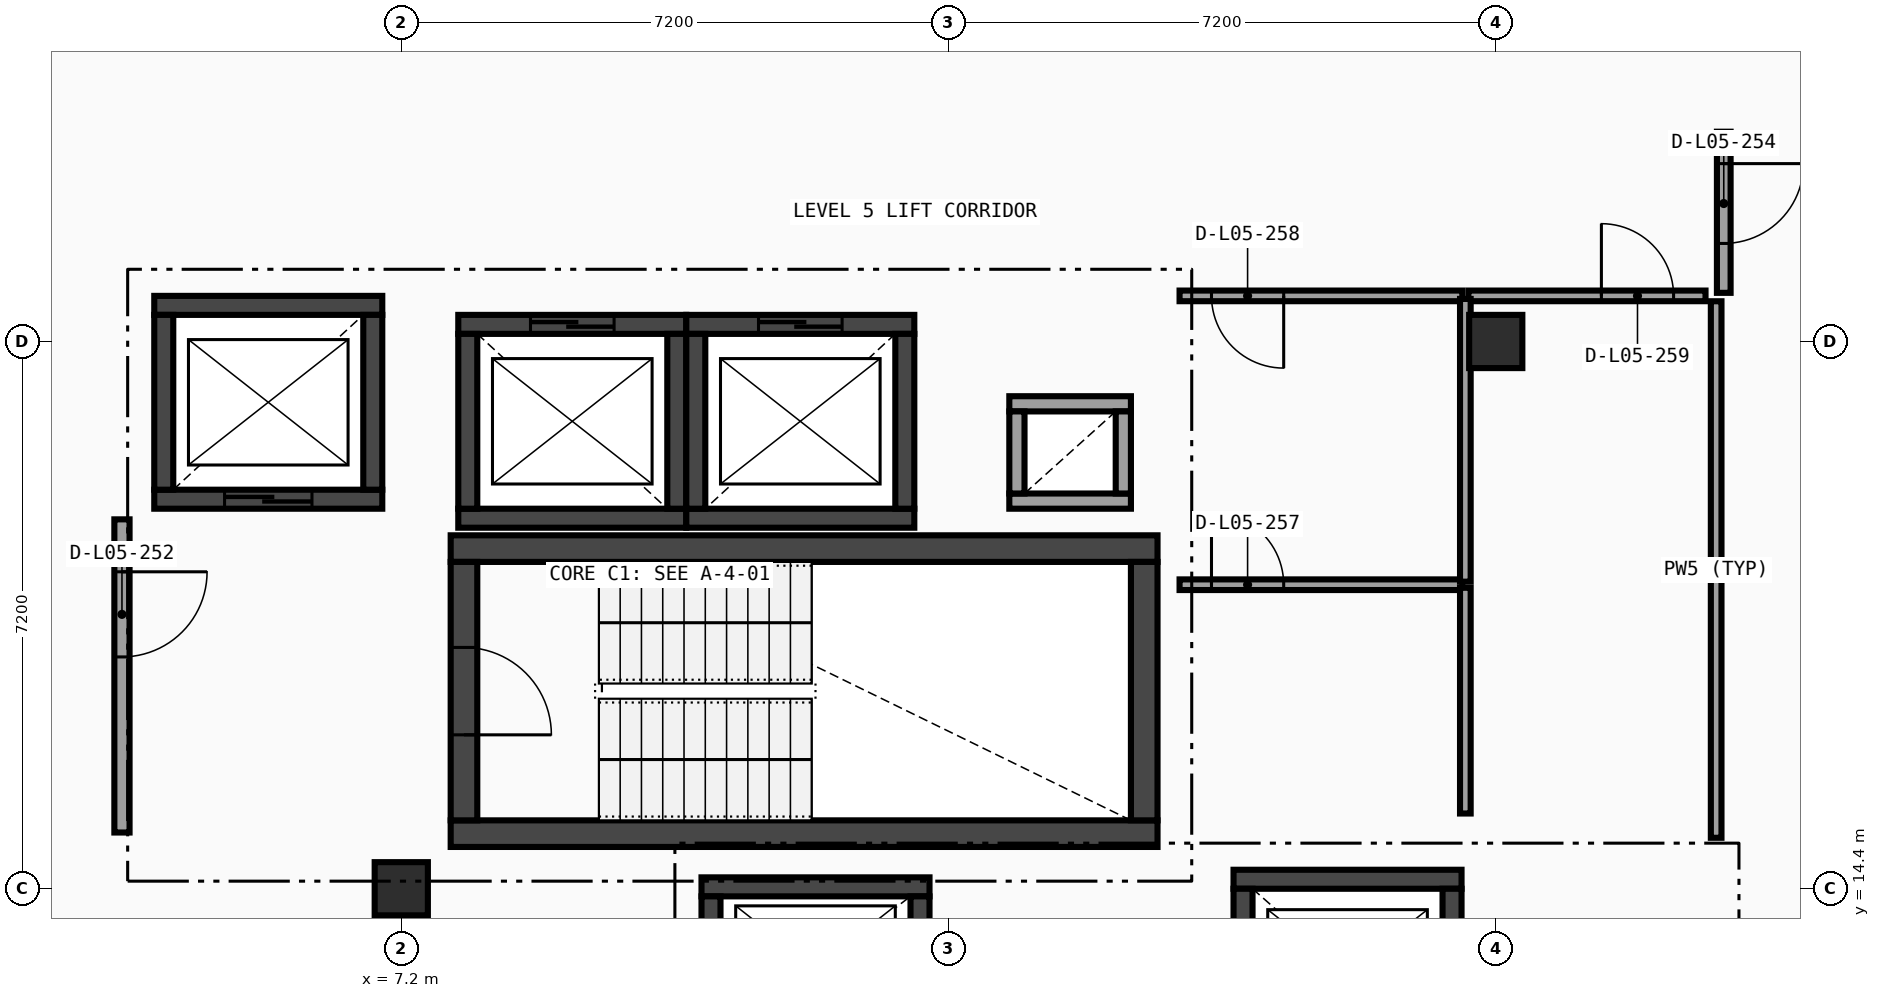
"""IFC4 building model, lengths in metres.
Left out: names, types, materials, properties, quantities, classifications, styles, units other than length and angle.
Written with IfcOpenShell. Run it as: python <this file> out.ifc"""

import sys

from ifc_helpers import new_model, si_unit, direction, frame, frame_2d, origin, origin_2d, place, context, subcontext, project, spatial, rectangle, extrude, element, fill, save


model = new_model("IFC4")
c1 = context("Model", 3, precision=1e-05, world=origin(), true_north=direction((0.0, 1.0)))
c2 = subcontext(c1, "Body", "Model", "MODEL_VIEW")
j1 = project(units=[si_unit("LENGTHUNIT", "METRE"), si_unit("PLANEANGLEUNIT", "RADIAN")], contexts=[c1])
p1 = place(None, origin())
s1 = spatial("IfcSite", under=j1, at=p1, CompositionType="ELEMENT")
p2 = place(p1, origin())
s2 = spatial("IfcBuilding", under=s1, at=p2, CompositionType="ELEMENT")
p3 = place(p2, frame((0.0, 0.0, 22.95)))
s3 = spatial("IfcBuildingStorey", under=s2, at=p3, CompositionType="ELEMENT", Elevation=22.95)
for number, where, z_axis, x_axis in (
    (1, (7.2, 14.4, 0.0), (0.0, 0.0, 1.0), (1.0, 0.0, 0.0)),
    (2, (21.6, 21.6, 0.0), (0.0, 0.0, 1.0), (1.0, 0.0, 0.0)),
):
    element("IfcColumn", number, at=place(p3, frame(where, z_axis=z_axis, x_axis=x_axis)), inside=s3, PredefinedType="COLUMN", context=c2, shape_type="SweptSolid", body=[
        extrude(rectangle(XDim=0.7, YDim=0.7, at=origin_2d()), origin(), (0.0, 0.0, 1.0), 4.05),
    ])
for number, where, z_axis, x_axis in (
    (3, (7.85, 15.125, 0.0), (0.0, 0.0, 1.0), (1.0, 0.0, 0.0)),
    (4, (17.15, 18.875, 0.0), (0.0, 0.0, 1.0), (-1.0, 0.0, 0.0)),
):
    element("IfcWall", number, at=place(p3, frame(where, z_axis=z_axis, x_axis=x_axis)), inside=s3, PredefinedType="SHEAR", context=c2, shape_type="SweptSolid", body=[
        extrude(rectangle(XDim=9.3, YDim=0.35, at=frame_2d((4.65, 0.0))), origin(), (0.0, 0.0, 1.0), 3.8),
    ])
p4 = place(p3, frame((8.025, 18.7, 0.0), z_axis=(0.0, 0.0, 1.0), x_axis=(0.0, -1.0, 0.0)))
e5 = element("IfcWall", 5, at=p4, inside=s3, PredefinedType="SHEAR", context=c2, shape_type="SweptSolid", body=[
    extrude(rectangle(XDim=3.4, YDim=0.35, at=frame_2d((1.7, 0.0))), origin(), (0.0, 0.0, 1.0), 3.8),
])
p5 = place(p4, frame((1.125, 0.0, 0.0)))
e6 = element("IfcOpeningElement", 6, at=p5, cuts=e5, PredefinedType="OPENING", context=c2, shape_type="SweptSolid", body=[
    extrude(rectangle(XDim=1.15, YDim=2.1, at=frame_2d((0.575, 1.05))), frame((0.0, 0.185, 0.0), z_axis=(0.0, -1.0, 0.0), x_axis=(1.0, 0.0, 0.0)), (0.0, 0.0, 1.0), 0.37),
])
p6 = place(p3, frame((16.975, 15.3, 0.0), z_axis=(0.0, 0.0, 1.0), x_axis=(0.0, 1.0, 0.0)))
e7 = element("IfcWall", 7, at=p6, inside=s3, PredefinedType="SHEAR", context=c2, shape_type="SweptSolid", body=[
    extrude(rectangle(XDim=3.4, YDim=0.35, at=frame_2d((1.7, 0.0))), origin(), (0.0, 0.0, 1.0), 3.8),
])
p7 = place(p3, frame((3.95, 19.525, 0.0), z_axis=(0.0, 0.0, 1.0), x_axis=(1.0, 0.0, 0.0)))
e8 = element("IfcWall", 8, at=p7, inside=s3, PredefinedType="SHEAR", context=c2, shape_type="SweptSolid", body=[
    extrude(rectangle(XDim=3.0, YDim=0.25, at=frame_2d((1.5, 0.0))), origin(), (0.0, 0.0, 1.0), 3.8),
])
p8 = place(p7, frame((0.925, 0.0, 0.0)))
e9 = element("IfcOpeningElement", 9, at=p8, cuts=e8, PredefinedType="OPENING", context=c2, shape_type="SweptSolid", body=[
    extrude(rectangle(XDim=1.15, YDim=2.1, at=frame_2d((0.575, 1.05))), frame((0.0, 0.135, 0.0), z_axis=(0.0, -1.0, 0.0), x_axis=(1.0, 0.0, 0.0)), (0.0, 0.0, 1.0), 0.27),
])
p9 = place(p3, frame((6.95, 22.075, 0.0), z_axis=(0.0, 0.0, 1.0), x_axis=(-1.0, 0.0, 0.0)))
e10 = element("IfcWall", 10, at=p9, inside=s3, PredefinedType="SHEAR", context=c2, shape_type="SweptSolid", body=[
    extrude(rectangle(XDim=3.0, YDim=0.25, at=frame_2d((1.5, 0.0))), origin(), (0.0, 0.0, 1.0), 3.8),
])
for number, where, z_axis, x_axis in (
    (11, (4.075, 21.95, 0.0), (0.0, 0.0, 1.0), (0.0, -1.0, 0.0)),
    (12, (6.825, 19.65, 0.0), (0.0, 0.0, 1.0), (0.0, 1.0, 0.0)),
):
    element("IfcWall", number, at=place(p3, frame(where, z_axis=z_axis, x_axis=x_axis)), inside=s3, PredefinedType="SHEAR", context=c2, shape_type="SweptSolid", body=[
        extrude(rectangle(XDim=2.3, YDim=0.25, at=frame_2d((1.15, 0.0))), origin(), (0.0, 0.0, 1.0), 3.8),
    ])
p10 = place(p3, frame((7.95, 19.275, 0.0), z_axis=(0.0, 0.0, 1.0), x_axis=(1.0, 0.0, 0.0)))
e13 = element("IfcWall", 13, at=p10, inside=s3, PredefinedType="SHEAR", context=c2, shape_type="SweptSolid", body=[
    extrude(rectangle(XDim=3.0, YDim=0.25, at=frame_2d((1.5, 0.0))), origin(), (0.0, 0.0, 1.0), 3.8),
])
p11 = place(p3, frame((10.95, 21.825, 0.0), z_axis=(0.0, 0.0, 1.0), x_axis=(-1.0, 0.0, 0.0)))
e14 = element("IfcWall", 14, at=p11, inside=s3, PredefinedType="SHEAR", context=c2, shape_type="SweptSolid", body=[
    extrude(rectangle(XDim=3.0, YDim=0.25, at=frame_2d((1.5, 0.0))), origin(), (0.0, 0.0, 1.0), 3.8),
])
p12 = place(p11, frame((0.95, 0.0, 0.0)))
e15 = element("IfcOpeningElement", 15, at=p12, cuts=e14, PredefinedType="OPENING", context=c2, shape_type="SweptSolid", body=[
    extrude(rectangle(XDim=1.1, YDim=2.1, at=frame_2d((0.55, 1.05))), frame((0.0, 0.135, 0.0), z_axis=(0.0, -1.0, 0.0), x_axis=(1.0, 0.0, 0.0)), (0.0, 0.0, 1.0), 0.27),
])
for number, where, z_axis, x_axis in (
    (16, (8.075, 21.7, 0.0), (0.0, 0.0, 1.0), (0.0, -1.0, 0.0)),
    (17, (10.825, 19.4, 0.0), (0.0, 0.0, 1.0), (0.0, 1.0, 0.0)),
):
    element("IfcWall", number, at=place(p3, frame(where, z_axis=z_axis, x_axis=x_axis)), inside=s3, PredefinedType="SHEAR", context=c2, shape_type="SweptSolid", body=[
        extrude(rectangle(XDim=2.3, YDim=0.25, at=frame_2d((1.15, 0.0))), origin(), (0.0, 0.0, 1.0), 3.8),
    ])
p13 = place(p3, frame((10.95, 19.275, 0.0), z_axis=(0.0, 0.0, 1.0), x_axis=(1.0, 0.0, 0.0)))
e18 = element("IfcWall", 18, at=p13, inside=s3, PredefinedType="SHEAR", context=c2, shape_type="SweptSolid", body=[
    extrude(rectangle(XDim=3.0, YDim=0.25, at=frame_2d((1.5, 0.0))), origin(), (0.0, 0.0, 1.0), 3.8),
])
p14 = place(p3, frame((13.95, 21.825, 0.0), z_axis=(0.0, 0.0, 1.0), x_axis=(-1.0, 0.0, 0.0)))
e19 = element("IfcWall", 19, at=p14, inside=s3, PredefinedType="SHEAR", context=c2, shape_type="SweptSolid", body=[
    extrude(rectangle(XDim=3.0, YDim=0.25, at=frame_2d((1.5, 0.0))), origin(), (0.0, 0.0, 1.0), 3.8),
])
p15 = place(p14, frame((0.95, 0.0, 0.0)))
e20 = element("IfcOpeningElement", 20, at=p15, cuts=e19, PredefinedType="OPENING", context=c2, shape_type="SweptSolid", body=[
    extrude(rectangle(XDim=1.1, YDim=2.1, at=frame_2d((0.55, 1.05))), frame((0.0, 0.135, 0.0), z_axis=(0.0, -1.0, 0.0), x_axis=(1.0, 0.0, 0.0)), (0.0, 0.0, 1.0), 0.27),
])
for number, where, z_axis, x_axis in (
    (21, (11.075, 21.7, 0.0), (0.0, 0.0, 1.0), (0.0, -1.0, 0.0)),
    (22, (13.825, 19.4, 0.0), (0.0, 0.0, 1.0), (0.0, 1.0, 0.0)),
):
    element("IfcWall", number, at=place(p3, frame(where, z_axis=z_axis, x_axis=x_axis)), inside=s3, PredefinedType="SHEAR", context=c2, shape_type="SweptSolid", body=[
        extrude(rectangle(XDim=2.3, YDim=0.25, at=frame_2d((1.15, 0.0))), origin(), (0.0, 0.0, 1.0), 3.8),
    ])
p16 = place(p3, frame((14.15, 14.425, 0.0), z_axis=(0.0, 0.0, 1.0), x_axis=(-1.0, 0.0, 0.0)))
e23 = element("IfcWall", 23, at=p16, inside=s3, PredefinedType="SHEAR", context=c2, shape_type="SweptSolid", body=[
    extrude(rectangle(XDim=3.0, YDim=0.25, at=frame_2d((1.5, 0.0))), origin(), (0.0, 0.0, 1.0), 3.8),
])
for number, where, z_axis, x_axis in (
    (24, (11.275, 14.3, 0.0), (0.0, 0.0, 1.0), (0.0, -1.0, 0.0)),
    (25, (14.025, 12.4, 0.0), (0.0, 0.0, 1.0), (0.0, 1.0, 0.0)),
):
    element("IfcWall", number, at=place(p3, frame(where, z_axis=z_axis, x_axis=x_axis)), inside=s3, PredefinedType="SHEAR", context=c2, shape_type="SweptSolid", body=[
        extrude(rectangle(XDim=1.9, YDim=0.25, at=frame_2d((0.95, 0.0))), origin(), (0.0, 0.0, 1.0), 3.8),
    ])
p17 = place(p3, frame((21.15, 14.525, 0.0), z_axis=(0.0, 0.0, 1.0), x_axis=(-1.0, 0.0, 0.0)))
e26 = element("IfcWall", 26, at=p17, inside=s3, PredefinedType="SHEAR", context=c2, shape_type="SweptSolid", body=[
    extrude(rectangle(XDim=3.0, YDim=0.25, at=frame_2d((1.5, 0.0))), origin(), (0.0, 0.0, 1.0), 3.8),
])
p18 = place(p3, frame((18.275, 14.4, 0.0), z_axis=(0.0, 0.0, 1.0), x_axis=(0.0, -1.0, 0.0)))
e27 = element("IfcWall", 27, at=p18, inside=s3, PredefinedType="SHEAR", context=c2, shape_type="SweptSolid", body=[
    extrude(rectangle(XDim=2.2, YDim=0.25, at=frame_2d((1.1, 0.0))), origin(), (0.0, 0.0, 1.0), 3.8),
])
p19 = place(p18, frame((0.55, 0.0, 0.0)))
e28 = element("IfcOpeningElement", 28, at=p19, cuts=e27, PredefinedType="OPENING", context=c2, shape_type="SweptSolid", body=[
    extrude(rectangle(XDim=1.1, YDim=2.1, at=frame_2d((0.55, 1.05))), frame((0.0, 0.135, 0.0), z_axis=(0.0, -1.0, 0.0), x_axis=(1.0, 0.0, 0.0)), (0.0, 0.0, 1.0), 0.27),
])
p20 = place(p3, frame((21.025, 12.2, 0.0), z_axis=(0.0, 0.0, 1.0), x_axis=(0.0, 1.0, 0.0)))
e29 = element("IfcWall", 29, at=p20, inside=s3, PredefinedType="SHEAR", context=c2, shape_type="SweptSolid", body=[
    extrude(rectangle(XDim=2.2, YDim=0.25, at=frame_2d((1.1, 0.0))), origin(), (0.0, 0.0, 1.0), 3.8),
])
for number, where, z_axis, x_axis in (
    (30, (15.2, 19.5, 0.0), (0.0, 0.0, 1.0), (1.0, 0.0, 0.0)),
    (31, (16.8, 20.78, 0.0), (0.0, 0.0, 1.0), (-1.0, 0.0, 0.0)),
):
    element("IfcWall", number, at=place(p3, frame(where, z_axis=z_axis, x_axis=x_axis)), inside=s3, PredefinedType="SOLIDWALL", context=c2, shape_type="SweptSolid", body=[
        extrude(rectangle(XDim=1.6, YDim=0.2, at=frame_2d((0.8, 0.0))), origin(), (0.0, 0.0, 1.0), 3.8),
    ])
for number, where, z_axis, x_axis in (
    (32, (15.3, 20.68, 0.0), (0.0, 0.0, 1.0), (0.0, -1.0, 0.0)),
    (33, (16.7, 19.6, 0.0), (0.0, 0.0, 1.0), (0.0, 1.0, 0.0)),
):
    element("IfcWall", number, at=place(p3, frame(where, z_axis=z_axis, x_axis=x_axis)), inside=s3, PredefinedType="SOLIDWALL", context=c2, shape_type="SweptSolid", body=[
        extrude(rectangle(XDim=1.08, YDim=0.2, at=frame_2d((0.54, 0.0))), origin(), (0.0, 0.0, 1.0), 3.8),
    ])
p21 = place(p3, frame((3.525, 15.14, 0.0), z_axis=(0.0, 0.0, 1.0), x_axis=(0.0, 1.0, 0.0)))
e34 = element("IfcWall", 34, at=p21, inside=s3, PredefinedType="PARTITIONING", context=c2, shape_type="SweptSolid", body=[
    extrude(rectangle(XDim=4.12, YDim=0.2, at=frame_2d((2.06, 0.0))), origin(), (0.0, 0.0, 1.0), 3.8),
])
p22 = place(p21, frame((2.31, 0.0, 0.0)))
e35 = element("IfcOpeningElement", 35, at=p22, cuts=e34, PredefinedType="OPENING", context=c2, shape_type="SweptSolid", body=[
    extrude(rectangle(XDim=1.12, YDim=2.1, at=frame_2d((0.56, 1.05))), frame((0.0, 0.11, 0.0), z_axis=(0.0, -1.0, 0.0), x_axis=(1.0, 0.0, 0.0)), (0.0, 0.0, 1.0), 0.22),
])
p23 = place(p3, frame((24.6, 22.24, 0.0), z_axis=(0.0, 0.0, 1.0), x_axis=(0.0, 1.0, 0.0)))
e36 = element("IfcWall", 36, at=p23, inside=s3, PredefinedType="PARTITIONING", context=c2, shape_type="SweptSolid", body=[
    extrude(rectangle(XDim=2.12, YDim=0.18, at=frame_2d((1.06, 0.0))), origin(), (0.0, 0.0, 1.0), 3.286),
])
p24 = place(p23, frame((0.65, 0.0, 0.0)))
e37 = element("IfcOpeningElement", 37, at=p24, cuts=e36, PredefinedType="OPENING", context=c2, shape_type="SweptSolid", body=[
    extrude(rectangle(XDim=1.05, YDim=2.15, at=frame_2d((0.525, 1.075))), frame((0.0, 0.1, 0.0), z_axis=(0.0, -1.0, 0.0), x_axis=(1.0, 0.0, 0.0)), (0.0, 0.0, 1.0), 0.2),
])
p25 = place(p3, frame((17.44, 22.2, 0.0), z_axis=(0.0, 0.0, 1.0), x_axis=(1.0, 0.0, 0.0)))
e38 = element("IfcWall", 38, at=p25, inside=s3, PredefinedType="PARTITIONING", context=c2, shape_type="SweptSolid", body=[
    extrude(rectangle(XDim=3.72, YDim=0.14, at=frame_2d((1.86, 0.0))), origin(), (0.0, 0.0, 1.0), 3.8),
])
p26 = place(p25, frame((0.42, 0.0, 0.0)))
e39 = element("IfcOpeningElement", 39, at=p26, cuts=e38, PredefinedType="OPENING", context=c2, shape_type="SweptSolid", body=[
    extrude(rectangle(XDim=0.95, YDim=2.08, at=frame_2d((0.475, 1.04))), frame((0.0, 0.08, 0.0), z_axis=(0.0, -1.0, 0.0), x_axis=(1.0, 0.0, 0.0)), (0.0, 0.0, 1.0), 0.16),
])
p27 = place(p3, frame((21.24, 22.2, 0.0), z_axis=(0.0, 0.0, 1.0), x_axis=(1.0, 0.0, 0.0)))
e40 = element("IfcWall", 40, at=p27, inside=s3, PredefinedType="PARTITIONING", context=c2, shape_type="SweptSolid", body=[
    extrude(rectangle(XDim=3.12, YDim=0.14, at=frame_2d((1.56, 0.0))), origin(), (0.0, 0.0, 1.0), 3.206),
])
p28 = place(p27, frame((1.75, 0.0, 0.0)))
e41 = element("IfcOpeningElement", 41, at=p28, cuts=e40, PredefinedType="OPENING", context=c2, shape_type="SweptSolid", body=[
    extrude(rectangle(XDim=0.95, YDim=2.08, at=frame_2d((0.475, 1.04))), frame((0.0, 0.08, 0.0), z_axis=(0.0, -1.0, 0.0), x_axis=(1.0, 0.0, 0.0)), (0.0, 0.0, 1.0), 0.16),
])
p29 = place(p3, frame((24.5, 15.071, 0.0), z_axis=(0.0, 0.0, 1.0), x_axis=(0.0, 1.0, 0.0)))
e42 = element("IfcWall", 42, at=p29, inside=s3, PredefinedType="PARTITIONING", context=c2, shape_type="SweptSolid", body=[
    extrude(rectangle(XDim=7.059, YDim=0.14, at=frame_2d((3.529, 0.0))), origin(), (0.0, 0.0, 1.0), 3.206),
])
p30 = place(p3, frame((17.44, 18.4, 0.0), z_axis=(0.0, 0.0, 1.0), x_axis=(1.0, 0.0, 0.0)))
e43 = element("IfcWall", 43, at=p30, inside=s3, PredefinedType="PARTITIONING", context=c2, shape_type="SweptSolid", body=[
    extrude(rectangle(XDim=3.72, YDim=0.14, at=frame_2d((1.86, 0.0))), origin(), (0.0, 0.0, 1.0), 3.8),
])
p31 = place(p30, frame((0.42, 0.0, 0.0)))
e44 = element("IfcOpeningElement", 44, at=p31, cuts=e43, PredefinedType="OPENING", context=c2, shape_type="SweptSolid", body=[
    extrude(rectangle(XDim=0.95, YDim=2.08, at=frame_2d((0.475, 1.04))), frame((0.0, 0.08, 0.0), z_axis=(0.0, -1.0, 0.0), x_axis=(1.0, 0.0, 0.0)), (0.0, 0.0, 1.0), 0.16),
])
p32 = place(p3, frame((21.2, 15.39, 0.0), z_axis=(0.0, 0.0, 1.0), x_axis=(0.0, 1.0, 0.0)))
e45 = element("IfcWall", 45, at=p32, inside=s3, PredefinedType="PARTITIONING", context=c2, shape_type="SweptSolid", body=[
    extrude(rectangle(XDim=2.97, YDim=0.14, at=frame_2d((1.485, 0.0))), origin(), (0.0, 0.0, 1.0), 3.8),
])
p33 = place(p3, frame((21.2, 18.44, 0.0), z_axis=(0.0, 0.0, 1.0), x_axis=(0.0, 1.0, 0.0)))
e46 = element("IfcWall", 46, at=p33, inside=s3, PredefinedType="PARTITIONING", context=c2, shape_type="SweptSolid", body=[
    extrude(rectangle(XDim=3.72, YDim=0.14, at=frame_2d((1.86, 0.0))), origin(), (0.0, 0.0, 1.0), 3.8),
])
p34 = place(p5, frame((1.15, 0.0, 0.0), z_axis=(0.0, 0.0, 1.0), x_axis=(-1.0, 0.0, 0.0)))
e47 = element("IfcDoor", 47, at=p34, inside=s3, OperationType="SINGLE_SWING_LEFT", PredefinedType="DOOR", context=c2, shape_type="SweptSolid", body=[
    extrude(rectangle(XDim=1.15, YDim=2.1, at=frame_2d((0.575, 1.05))), frame((0.0, 0.025, 0.0), z_axis=(0.0, -1.0, 0.0), x_axis=(1.0, 0.0, 0.0)), (0.0, 0.0, 1.0), 0.05),
])
fill(e6, e47)
p35 = place(p8, origin())
e48 = element("IfcDoor", 48, at=p35, inside=s3, OperationType="SLIDING_TO_RIGHT", PredefinedType="DOOR", context=c2, shape_type="SweptSolid", body=[
    extrude(rectangle(XDim=1.15, YDim=2.1, at=frame_2d((0.575, 1.05))), frame((0.0, 0.025, 0.0), z_axis=(0.0, -1.0, 0.0), x_axis=(1.0, 0.0, 0.0)), (0.0, 0.0, 1.0), 0.05),
])
fill(e9, e48)
p36 = place(p12, origin())
e49 = element("IfcDoor", 49, at=p36, inside=s3, OperationType="SLIDING_TO_LEFT", PredefinedType="DOOR", context=c2, shape_type="SweptSolid", body=[
    extrude(rectangle(XDim=1.1, YDim=2.1, at=frame_2d((0.55, 1.05))), frame((0.0, 0.025, 0.0), z_axis=(0.0, -1.0, 0.0), x_axis=(1.0, 0.0, 0.0)), (0.0, 0.0, 1.0), 0.05),
])
fill(e15, e49)
p37 = place(p15, origin())
e50 = element("IfcDoor", 50, at=p37, inside=s3, OperationType="SLIDING_TO_LEFT", PredefinedType="DOOR", context=c2, shape_type="SweptSolid", body=[
    extrude(rectangle(XDim=1.1, YDim=2.1, at=frame_2d((0.55, 1.05))), frame((0.0, 0.025, 0.0), z_axis=(0.0, -1.0, 0.0), x_axis=(1.0, 0.0, 0.0)), (0.0, 0.0, 1.0), 0.05),
])
fill(e20, e50)
p38 = place(p22, origin())
e51 = element("IfcDoor", 51, at=p38, inside=s3, OperationType="SINGLE_SWING_RIGHT", PredefinedType="DOOR", context=c2, shape_type="SweptSolid", body=[
    extrude(rectangle(XDim=1.12, YDim=2.1, at=frame_2d((0.56, 1.05))), frame((0.0, 0.025, 0.0), z_axis=(0.0, -1.0, 0.0), x_axis=(1.0, 0.0, 0.0)), (0.0, 0.0, 1.0), 0.05),
])
fill(e35, e51)
p39 = place(p24, origin())
e52 = element("IfcDoor", 52, at=p39, inside=s3, OperationType="SINGLE_SWING_RIGHT", PredefinedType="DOOR", context=c2, shape_type="SweptSolid", body=[
    extrude(rectangle(XDim=1.05, YDim=2.15, at=frame_2d((0.525, 1.075))), frame((0.0, 0.025, 0.0), z_axis=(0.0, -1.0, 0.0), x_axis=(1.0, 0.0, 0.0)), (0.0, 0.0, 1.0), 0.05),
])
fill(e37, e52)
p40 = place(p31, origin())
e53 = element("IfcDoor", 53, at=p40, inside=s3, OperationType="SINGLE_SWING_LEFT", PredefinedType="DOOR", context=c2, shape_type="SweptSolid", body=[
    extrude(rectangle(XDim=0.95, YDim=2.08, at=frame_2d((0.475, 1.04))), frame((0.0, 0.025, 0.0), z_axis=(0.0, -1.0, 0.0), x_axis=(1.0, 0.0, 0.0)), (0.0, 0.0, 1.0), 0.05),
])
fill(e44, e53)
p41 = place(p26, origin())
e54 = element("IfcDoor", 54, at=p41, inside=s3, OperationType="SINGLE_SWING_RIGHT", PredefinedType="DOOR", context=c2, shape_type="SweptSolid", body=[
    extrude(rectangle(XDim=0.95, YDim=2.08, at=frame_2d((0.475, 1.04))), frame((0.0, 0.025, 0.0), z_axis=(0.0, -1.0, 0.0), x_axis=(1.0, 0.0, 0.0)), (0.0, 0.0, 1.0), 0.05),
])
fill(e39, e54)
p42 = place(p28, origin())
e55 = element("IfcDoor", 55, at=p42, inside=s3, OperationType="SINGLE_SWING_LEFT", PredefinedType="DOOR", context=c2, shape_type="SweptSolid", body=[
    extrude(rectangle(XDim=0.95, YDim=2.08, at=frame_2d((0.475, 1.04))), frame((0.0, 0.025, 0.0), z_axis=(0.0, -1.0, 0.0), x_axis=(1.0, 0.0, 0.0)), (0.0, 0.0, 1.0), 0.05),
])
fill(e41, e55)
save(model, sys.argv[1])
